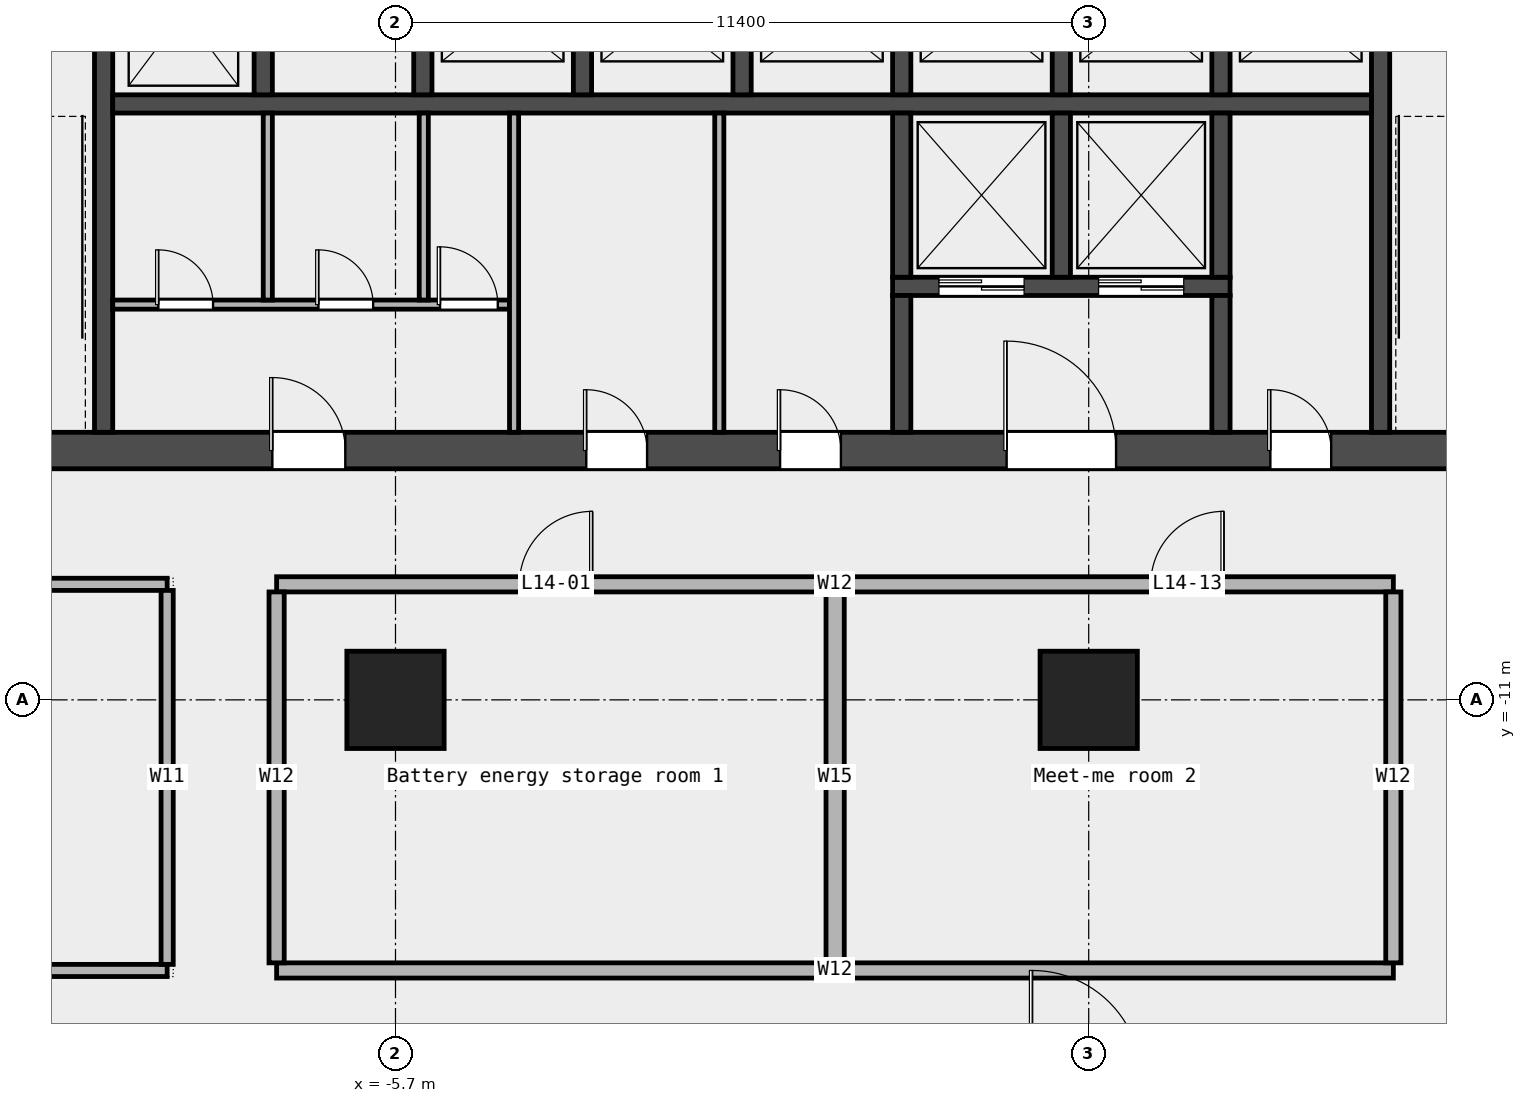
"""IFC4 building model, lengths in metres.
Left out: names, types, materials, properties, quantities, classifications, styles, units other than length and angle.
Written with IfcOpenShell. Run it as: python <this file> out.ifc"""

import sys

from ifc_helpers import new_model, si_unit, direction, frame, frame_2d, origin, origin_2d, place, context, subcontext, project, spatial, rectangle, extrude, element, fill, save


model = new_model("IFC4")
c1 = context("Model", 3, precision=1e-05, world=origin(), true_north=direction((0.0, 1.0)))
c2 = subcontext(c1, "Body", "Model", "MODEL_VIEW")
j1 = project(units=[si_unit("LENGTHUNIT", "METRE"), si_unit("PLANEANGLEUNIT", "RADIAN")], contexts=[c1])
p1 = place(None, origin())
s1 = spatial("IfcSite", under=j1, at=p1, CompositionType="ELEMENT")
p2 = place(p1, origin())
s2 = spatial("IfcBuilding", under=s1, at=p2, CompositionType="ELEMENT")
p3 = place(p2, frame((0.0, 0.0, 74.2)))
s3 = spatial("IfcBuildingStorey", under=s2, at=p3, CompositionType="ELEMENT", Elevation=74.2)
for number, where, z_axis, x_axis in (
    (1, (-5.7, -11.0, 0.0), (0.0, 0.0, 1.0), (1.0, 0.0, 0.0)),
    (2, (5.7, -11.0, 0.0), (0.0, 0.0, 1.0), (1.0, 0.0, 0.0)),
):
    element("IfcColumn", number, at=place(p3, frame(where, z_axis=z_axis, x_axis=x_axis)), inside=s3, PredefinedType="COLUMN", context=c2, shape_type="SweptSolid", body=[
        extrude(rectangle(XDim=1.6, YDim=1.6, at=origin_2d()), origin(), (0.0, 0.0, 1.0), 4.35),
    ])
p4 = place(p3, frame((-24.525, -15.45, 0.0), z_axis=(0.0, 0.0, 1.0), x_axis=(1.0, 0.0, 0.0)))
e3 = element("IfcWall", 3, at=p4, inside=s3, PredefinedType="PARTITIONING", context=c2, shape_type="SweptSolid", body=[
    extrude(rectangle(XDim=15.07, YDim=0.2, at=frame_2d((7.535, 0.0))), origin(), (0.0, 0.0, 1.0), 4.35),
])
p5 = place(p4, frame((6.785, 0.0, 0.0)))
e4 = element("IfcOpeningElement", 4, at=p5, cuts=e3, PredefinedType="OPENING", context=c2, shape_type="SweptSolid", body=[
    extrude(rectangle(XDim=1.5, YDim=2.1, at=frame_2d((0.75, 1.05))), frame((0.0, 0.112, 0.0), z_axis=(0.0, -1.0, 0.0), x_axis=(1.0, 0.0, 0.0)), (0.0, 0.0, 1.0), 0.224),
])
p6 = place(p3, frame((-7.655, -15.45, 0.0), z_axis=(0.0, 0.0, 1.0), x_axis=(1.0, 0.0, 0.0)))
e5 = element("IfcWall", 5, at=p6, inside=s3, PredefinedType="PARTITIONING", context=c2, shape_type="SweptSolid", body=[
    extrude(rectangle(XDim=18.365, YDim=0.25, at=frame_2d((9.183, 0.0))), origin(), (0.0, 0.0, 1.0), 4.35),
])
p7 = place(p3, frame((-16.3, -9.1, 0.0), z_axis=(0.0, 0.0, 1.0), x_axis=(1.0, 0.0, 0.0)))
e6 = element("IfcWall", 6, at=p7, inside=s3, PredefinedType="PARTITIONING", context=c2, shape_type="SweptSolid", body=[
    extrude(rectangle(XDim=6.845, YDim=0.2, at=frame_2d((3.422, 0.0))), origin(), (0.0, 0.0, 1.0), 4.35),
])
p8 = place(p3, frame((-7.655, -9.1, 0.0), z_axis=(0.0, 0.0, 1.0), x_axis=(1.0, 0.0, 0.0)))
e7 = element("IfcWall", 7, at=p8, inside=s3, PredefinedType="PARTITIONING", context=c2, shape_type="SweptSolid", body=[
    extrude(rectangle(XDim=18.365, YDim=0.25, at=frame_2d((9.183, 0.0))), origin(), (0.0, 0.0, 1.0), 4.35),
])
p9 = place(p8, frame((3.992, 0.0, 0.0)))
e8 = element("IfcOpeningElement", 8, at=p9, cuts=e7, PredefinedType="OPENING", context=c2, shape_type="SweptSolid", body=[
    extrude(rectangle(XDim=1.2, YDim=2.1, at=frame_2d((0.6, 1.05))), frame((0.0, 0.137, 0.0), z_axis=(0.0, -1.0, 0.0), x_axis=(1.0, 0.0, 0.0)), (0.0, 0.0, 1.0), 0.274),
])
p10 = place(p8, frame((14.375, 0.0, 0.0)))
e9 = element("IfcOpeningElement", 9, at=p10, cuts=e7, PredefinedType="OPENING", context=c2, shape_type="SweptSolid", body=[
    extrude(rectangle(XDim=1.2, YDim=2.1, at=frame_2d((0.6, 1.05))), frame((0.0, 0.137, 0.0), z_axis=(0.0, -1.0, 0.0), x_axis=(1.0, 0.0, 0.0)), (0.0, 0.0, 1.0), 0.274),
])
p11 = place(p3, frame((-9.455, -15.35, 0.0), z_axis=(0.0, 0.0, 1.0), x_axis=(0.0, 1.0, 0.0)))
e10 = element("IfcWall", 10, at=p11, inside=s3, PredefinedType="PARTITIONING", context=c2, shape_type="SweptSolid", body=[
    extrude(rectangle(XDim=6.15, YDim=0.2, at=frame_2d((3.075, 0.0))), origin(), (0.0, 0.0, 1.0), 4.35),
])
p12 = place(p3, frame((-7.655, -15.325, 0.0), z_axis=(0.0, 0.0, 1.0), x_axis=(0.0, 1.0, 0.0)))
e11 = element("IfcWall", 11, at=p12, inside=s3, PredefinedType="PARTITIONING", context=c2, shape_type="SweptSolid", body=[
    extrude(rectangle(XDim=6.1, YDim=0.25, at=frame_2d((3.05, 0.0))), origin(), (0.0, 0.0, 1.0), 4.35),
])
p13 = place(p3, frame((1.53, -15.325, 0.0), z_axis=(0.0, 0.0, 1.0), x_axis=(0.0, 1.0, 0.0)))
e12 = element("IfcWall", 12, at=p13, inside=s3, PredefinedType="PARTITIONING", context=c2, shape_type="SweptSolid", body=[
    extrude(rectangle(XDim=6.1, YDim=0.3, at=frame_2d((3.05, 0.0))), origin(), (0.0, 0.0, 1.0), 4.35),
])
p14 = place(p3, frame((10.71, -15.325, 0.0), z_axis=(0.0, 0.0, 1.0), x_axis=(0.0, 1.0, 0.0)))
e13 = element("IfcWall", 13, at=p14, inside=s3, PredefinedType="PARTITIONING", context=c2, shape_type="SweptSolid", body=[
    extrude(rectangle(XDim=6.1, YDim=0.25, at=frame_2d((3.05, 0.0))), origin(), (0.0, 0.0, 1.0), 4.35),
])
p15 = place(p3, frame((-14.4, -6.9, 0.0), z_axis=(0.0, 0.0, 1.0), x_axis=(1.0, 0.0, 0.0)))
e14 = element("IfcWall", 14, at=p15, inside=s3, PredefinedType="SHEAR", context=c2, shape_type="SweptSolid", body=[
    extrude(rectangle(XDim=28.8, YDim=0.6, at=frame_2d((14.4, 0.0))), origin(), (0.0, 0.0, 1.0), 4.5),
])
p16 = place(p15, frame((6.675, 0.0, 0.0)))
e15 = element("IfcOpeningElement", 15, at=p16, cuts=e14, PredefinedType="OPENING", context=c2, shape_type="SweptSolid", body=[
    extrude(rectangle(XDim=1.2, YDim=2.1, at=frame_2d((0.6, 1.05))), frame((0.0, 0.312, 0.0), z_axis=(0.0, -1.0, 0.0), x_axis=(1.0, 0.0, 0.0)), (0.0, 0.0, 1.0), 0.624),
])
p17 = place(p15, frame((11.837, 0.0, 0.0)))
e16 = element("IfcOpeningElement", 16, at=p17, cuts=e14, PredefinedType="OPENING", context=c2, shape_type="SweptSolid", body=[
    extrude(rectangle(XDim=1.0, YDim=2.1, at=frame_2d((0.5, 1.05))), frame((0.0, 0.312, 0.0), z_axis=(0.0, -1.0, 0.0), x_axis=(1.0, 0.0, 0.0)), (0.0, 0.0, 1.0), 0.624),
])
p18 = place(p15, frame((15.025, 0.0, 0.0)))
e17 = element("IfcOpeningElement", 17, at=p18, cuts=e14, PredefinedType="OPENING", context=c2, shape_type="SweptSolid", body=[
    extrude(rectangle(XDim=1.0, YDim=2.1, at=frame_2d((0.5, 1.05))), frame((0.0, 0.312, 0.0), z_axis=(0.0, -1.0, 0.0), x_axis=(1.0, 0.0, 0.0)), (0.0, 0.0, 1.0), 0.624),
])
p19 = place(p15, frame((18.75, 0.0, 0.0)))
e18 = element("IfcOpeningElement", 18, at=p19, cuts=e14, PredefinedType="OPENING", context=c2, shape_type="SweptSolid", body=[
    extrude(rectangle(XDim=1.8, YDim=2.1, at=frame_2d((0.9, 1.05))), frame((0.0, 0.312, 0.0), z_axis=(0.0, -1.0, 0.0), x_axis=(1.0, 0.0, 0.0)), (0.0, 0.0, 1.0), 0.624),
])
p20 = place(p15, frame((23.087, 0.0, 0.0)))
e19 = element("IfcOpeningElement", 19, at=p20, cuts=e14, PredefinedType="OPENING", context=c2, shape_type="SweptSolid", body=[
    extrude(rectangle(XDim=1.0, YDim=2.1, at=frame_2d((0.5, 1.05))), frame((0.0, 0.312, 0.0), z_axis=(0.0, -1.0, 0.0), x_axis=(1.0, 0.0, 0.0)), (0.0, 0.0, 1.0), 0.624),
])
for number, where, z_axis, x_axis in (
    (20, (-10.5, -6.6, 0.0), (0.0, 0.0, 1.0), (0.0, 1.0, 0.0)),
    (21, (10.5, -6.6, 0.0), (0.0, 0.0, 1.0), (0.0, 1.0, 0.0)),
):
    element("IfcWall", number, at=place(p3, frame(where, z_axis=z_axis, x_axis=x_axis)), inside=s3, PredefinedType="SHEAR", context=c2, shape_type="SweptSolid", body=[
        extrude(rectangle(XDim=8.55, YDim=0.3, at=frame_2d((4.275, 0.0))), origin(), (0.0, 0.0, 1.0), 4.5),
    ])
p21 = place(p3, frame((-10.35, -1.2, 0.0), z_axis=(0.0, 0.0, 1.0), x_axis=(1.0, 0.0, 0.0)))
e22 = element("IfcWall", 22, at=p21, inside=s3, PredefinedType="SOLIDWALL", context=c2, shape_type="SweptSolid", body=[
    extrude(rectangle(XDim=20.7, YDim=0.3, at=frame_2d((10.35, 0.0))), origin(), (0.0, 0.0, 1.0), 4.5),
])
for number, where, z_axis, x_axis in (
    (23, (-7.875, -1.05, 0.0), (0.0, 0.0, 1.0), (0.0, 1.0, 0.0)),
    (24, (-5.25, -1.05, 0.0), (0.0, 0.0, 1.0), (0.0, 1.0, 0.0)),
    (25, (-2.625, -1.05, 0.0), (0.0, 0.0, 1.0), (0.0, 1.0, 0.0)),
    (26, (0.0, -1.05, 0.0), (0.0, 0.0, 1.0), (0.0, 1.0, 0.0)),
    (27, (2.625, -1.05, 0.0), (0.0, 0.0, 1.0), (0.0, 1.0, 0.0)),
    (28, (5.25, -1.05, 0.0), (0.0, 0.0, 1.0), (0.0, 1.0, 0.0)),
    (29, (7.875, -1.05, 0.0), (0.0, 0.0, 1.0), (0.0, 1.0, 0.0)),
):
    element("IfcWall", number, at=place(p3, frame(where, z_axis=z_axis, x_axis=x_axis)), inside=s3, PredefinedType="SOLIDWALL", context=c2, shape_type="SweptSolid", body=[
        extrude(rectangle(XDim=2.7, YDim=0.3, at=frame_2d((1.35, 0.0))), origin(), (0.0, 0.0, 1.0), 4.5),
    ])
p22 = place(p3, frame((2.475, -4.2, 0.0), z_axis=(0.0, 0.0, 1.0), x_axis=(1.0, 0.0, 0.0)))
e30 = element("IfcWall", 30, at=p22, inside=s3, PredefinedType="SOLIDWALL", context=c2, shape_type="SweptSolid", body=[
    extrude(rectangle(XDim=5.55, YDim=0.3, at=frame_2d((2.775, 0.0))), origin(), (0.0, 0.0, 1.0), 4.5),
])
p23 = place(p22, frame((0.762, 0.0, 0.0)))
e31 = element("IfcOpeningElement", 31, at=p23, cuts=e30, PredefinedType="OPENING", context=c2, shape_type="SweptSolid", body=[
    extrude(rectangle(XDim=1.4, YDim=2.1, at=frame_2d((0.7, 1.05))), frame((0.0, 0.162, 0.0), z_axis=(0.0, -1.0, 0.0), x_axis=(1.0, 0.0, 0.0)), (0.0, 0.0, 1.0), 0.324),
])
p24 = place(p22, frame((3.387, 0.0, 0.0)))
e32 = element("IfcOpeningElement", 32, at=p24, cuts=e30, PredefinedType="OPENING", context=c2, shape_type="SweptSolid", body=[
    extrude(rectangle(XDim=1.4, YDim=2.1, at=frame_2d((0.7, 1.05))), frame((0.0, 0.162, 0.0), z_axis=(0.0, -1.0, 0.0), x_axis=(1.0, 0.0, 0.0)), (0.0, 0.0, 1.0), 0.324),
])
p25 = place(p3, frame((2.625, -4.05, 0.0), z_axis=(0.0, 0.0, 1.0), x_axis=(0.0, 1.0, 0.0)))
e33 = element("IfcWall", 33, at=p25, inside=s3, PredefinedType="SOLIDWALL", context=c2, shape_type="SweptSolid", body=[
    extrude(rectangle(XDim=2.7, YDim=0.3, at=frame_2d((1.35, 0.0))), origin(), (0.0, 0.0, 1.0), 4.5),
])
p26 = place(p3, frame((2.625, -6.6, 0.0), z_axis=(0.0, 0.0, 1.0), x_axis=(0.0, 1.0, 0.0)))
e34 = element("IfcWall", 34, at=p26, inside=s3, PredefinedType="SOLIDWALL", context=c2, shape_type="SweptSolid", body=[
    extrude(rectangle(XDim=2.25, YDim=0.3, at=frame_2d((1.125, 0.0))), origin(), (0.0, 0.0, 1.0), 4.5),
])
for number, where, z_axis, x_axis in (
    (35, (5.25, -4.05, 0.0), (0.0, 0.0, 1.0), (0.0, 1.0, 0.0)),
    (36, (7.875, -4.05, 0.0), (0.0, 0.0, 1.0), (0.0, 1.0, 0.0)),
):
    element("IfcWall", number, at=place(p3, frame(where, z_axis=z_axis, x_axis=x_axis)), inside=s3, PredefinedType="SOLIDWALL", context=c2, shape_type="SweptSolid", body=[
        extrude(rectangle(XDim=2.7, YDim=0.3, at=frame_2d((1.35, 0.0))), origin(), (0.0, 0.0, 1.0), 4.5),
    ])
p27 = place(p3, frame((7.875, -6.6, 0.0), z_axis=(0.0, 0.0, 1.0), x_axis=(0.0, 1.0, 0.0)))
e37 = element("IfcWall", 37, at=p27, inside=s3, PredefinedType="SOLIDWALL", context=c2, shape_type="SweptSolid", body=[
    extrude(rectangle(XDim=2.25, YDim=0.3, at=frame_2d((1.125, 0.0))), origin(), (0.0, 0.0, 1.0), 4.5),
])
p28 = place(p3, frame((-10.35, -4.5, 0.0), z_axis=(0.0, 0.0, 1.0), x_axis=(1.0, 0.0, 0.0)))
e38 = element("IfcWall", 38, at=p28, inside=s3, PredefinedType="PARTITIONING", context=c2, shape_type="SweptSolid", body=[
    extrude(rectangle(XDim=6.525, YDim=0.15, at=frame_2d((3.263, 0.0))), origin(), (0.0, 0.0, 1.0), 4.5),
])
p29 = place(p28, frame((0.75, 0.0, 0.0)))
e39 = element("IfcOpeningElement", 39, at=p29, cuts=e38, PredefinedType="OPENING", context=c2, shape_type="SweptSolid", body=[
    extrude(rectangle(XDim=0.9, YDim=2.1, at=frame_2d((0.45, 1.05))), frame((0.0, 0.087, 0.0), z_axis=(0.0, -1.0, 0.0), x_axis=(1.0, 0.0, 0.0)), (0.0, 0.0, 1.0), 0.174),
])
p30 = place(p28, frame((3.383, 0.0, 0.0)))
e40 = element("IfcOpeningElement", 40, at=p30, cuts=e38, PredefinedType="OPENING", context=c2, shape_type="SweptSolid", body=[
    extrude(rectangle(XDim=0.9, YDim=2.1, at=frame_2d((0.45, 1.05))), frame((0.0, 0.087, 0.0), z_axis=(0.0, -1.0, 0.0), x_axis=(1.0, 0.0, 0.0)), (0.0, 0.0, 1.0), 0.174),
])
p31 = place(p28, frame((5.383, 0.0, 0.0)))
e41 = element("IfcOpeningElement", 41, at=p31, cuts=e38, PredefinedType="OPENING", context=c2, shape_type="SweptSolid", body=[
    extrude(rectangle(XDim=0.95, YDim=2.1, at=frame_2d((0.475, 1.05))), frame((0.0, 0.087, 0.0), z_axis=(0.0, -1.0, 0.0), x_axis=(1.0, 0.0, 0.0)), (0.0, 0.0, 1.0), 0.174),
])
for number, where, z_axis, x_axis in (
    (42, (-7.8, -4.425, 0.0), (0.0, 0.0, 1.0), (0.0, 1.0, 0.0)),
    (43, (-5.235, -4.425, 0.0), (0.0, 0.0, 1.0), (0.0, 1.0, 0.0)),
):
    element("IfcWall", number, at=place(p3, frame(where, z_axis=z_axis, x_axis=x_axis)), inside=s3, PredefinedType="PARTITIONING", context=c2, shape_type="SweptSolid", body=[
        extrude(rectangle(XDim=3.075, YDim=0.15, at=frame_2d((1.538, 0.0))), origin(), (0.0, 0.0, 1.0), 4.5),
    ])
for number, where, z_axis, x_axis in (
    (44, (-3.75, -6.6, 0.0), (0.0, 0.0, 1.0), (0.0, 1.0, 0.0)),
    (45, (-0.375, -6.6, 0.0), (0.0, 0.0, 1.0), (0.0, 1.0, 0.0)),
):
    element("IfcWall", number, at=place(p3, frame(where, z_axis=z_axis, x_axis=x_axis)), inside=s3, PredefinedType="PARTITIONING", context=c2, shape_type="SweptSolid", body=[
        extrude(rectangle(XDim=5.25, YDim=0.15, at=frame_2d((2.625, 0.0))), origin(), (0.0, 0.0, 1.0), 4.5),
    ])
p32 = place(p9, origin())
e46 = element("IfcDoor", 46, at=p32, inside=s3, OperationType="SINGLE_SWING_RIGHT", PredefinedType="DOOR", context=c2, shape_type="SweptSolid", body=[
    extrude(rectangle(XDim=1.2, YDim=2.1, at=frame_2d((0.6, 1.05))), frame((0.0, 0.025, 0.0), z_axis=(0.0, -1.0, 0.0), x_axis=(1.0, 0.0, 0.0)), (0.0, 0.0, 1.0), 0.05),
])
fill(e8, e46)
p33 = place(p10, origin())
e47 = element("IfcDoor", 47, at=p33, inside=s3, OperationType="SINGLE_SWING_RIGHT", PredefinedType="DOOR", context=c2, shape_type="SweptSolid", body=[
    extrude(rectangle(XDim=1.2, YDim=2.1, at=frame_2d((0.6, 1.05))), frame((0.0, 0.025, 0.0), z_axis=(0.0, -1.0, 0.0), x_axis=(1.0, 0.0, 0.0)), (0.0, 0.0, 1.0), 0.05),
])
fill(e9, e47)
p34 = place(p23, origin())
e48 = element("IfcDoor", 48, at=p34, inside=s3, OperationType="DOUBLE_DOOR_SLIDING", PredefinedType="DOOR", context=c2, shape_type="SweptSolid", body=[
    extrude(rectangle(XDim=1.4, YDim=2.1, at=frame_2d((0.7, 1.05))), frame((0.0, 0.025, 0.0), z_axis=(0.0, -1.0, 0.0), x_axis=(1.0, 0.0, 0.0)), (0.0, 0.0, 1.0), 0.05),
])
fill(e31, e48)
p35 = place(p24, origin())
e49 = element("IfcDoor", 49, at=p35, inside=s3, OperationType="DOUBLE_DOOR_SLIDING", PredefinedType="DOOR", context=c2, shape_type="SweptSolid", body=[
    extrude(rectangle(XDim=1.4, YDim=2.1, at=frame_2d((0.7, 1.05))), frame((0.0, 0.025, 0.0), z_axis=(0.0, -1.0, 0.0), x_axis=(1.0, 0.0, 0.0)), (0.0, 0.0, 1.0), 0.05),
])
fill(e32, e49)
p36 = place(p16, origin())
e50 = element("IfcDoor", 50, at=p36, inside=s3, OperationType="SINGLE_SWING_LEFT", PredefinedType="DOOR", context=c2, shape_type="SweptSolid", body=[
    extrude(rectangle(XDim=1.2, YDim=2.1, at=frame_2d((0.6, 1.05))), frame((0.0, 0.025, 0.0), z_axis=(0.0, -1.0, 0.0), x_axis=(1.0, 0.0, 0.0)), (0.0, 0.0, 1.0), 0.05),
])
fill(e15, e50)
p37 = place(p29, origin())
e51 = element("IfcDoor", 51, at=p37, inside=s3, OperationType="SINGLE_SWING_LEFT", PredefinedType="DOOR", context=c2, shape_type="SweptSolid", body=[
    extrude(rectangle(XDim=0.9, YDim=2.1, at=frame_2d((0.45, 1.05))), frame((0.0, 0.025, 0.0), z_axis=(0.0, -1.0, 0.0), x_axis=(1.0, 0.0, 0.0)), (0.0, 0.0, 1.0), 0.05),
])
fill(e39, e51)
p38 = place(p30, origin())
e52 = element("IfcDoor", 52, at=p38, inside=s3, OperationType="SINGLE_SWING_LEFT", PredefinedType="DOOR", context=c2, shape_type="SweptSolid", body=[
    extrude(rectangle(XDim=0.9, YDim=2.1, at=frame_2d((0.45, 1.05))), frame((0.0, 0.025, 0.0), z_axis=(0.0, -1.0, 0.0), x_axis=(1.0, 0.0, 0.0)), (0.0, 0.0, 1.0), 0.05),
])
fill(e40, e52)
p39 = place(p31, origin())
e53 = element("IfcDoor", 53, at=p39, inside=s3, OperationType="SINGLE_SWING_LEFT", PredefinedType="DOOR", context=c2, shape_type="SweptSolid", body=[
    extrude(rectangle(XDim=0.95, YDim=2.1, at=frame_2d((0.475, 1.05))), frame((0.0, 0.025, 0.0), z_axis=(0.0, -1.0, 0.0), x_axis=(1.0, 0.0, 0.0)), (0.0, 0.0, 1.0), 0.05),
])
fill(e41, e53)
p40 = place(p17, origin())
e54 = element("IfcDoor", 54, at=p40, inside=s3, OperationType="SINGLE_SWING_LEFT", PredefinedType="DOOR", context=c2, shape_type="SweptSolid", body=[
    extrude(rectangle(XDim=1.0, YDim=2.1, at=frame_2d((0.5, 1.05))), frame((0.0, 0.025, 0.0), z_axis=(0.0, -1.0, 0.0), x_axis=(1.0, 0.0, 0.0)), (0.0, 0.0, 1.0), 0.05),
])
fill(e16, e54)
p41 = place(p18, origin())
e55 = element("IfcDoor", 55, at=p41, inside=s3, OperationType="SINGLE_SWING_LEFT", PredefinedType="DOOR", context=c2, shape_type="SweptSolid", body=[
    extrude(rectangle(XDim=1.0, YDim=2.1, at=frame_2d((0.5, 1.05))), frame((0.0, 0.025, 0.0), z_axis=(0.0, -1.0, 0.0), x_axis=(1.0, 0.0, 0.0)), (0.0, 0.0, 1.0), 0.05),
])
fill(e17, e55)
p42 = place(p19, origin())
e56 = element("IfcDoor", 56, at=p42, inside=s3, OperationType="DOUBLE_DOOR_SINGLE_SWING", PredefinedType="DOOR", context=c2, shape_type="SweptSolid", body=[
    extrude(rectangle(XDim=1.8, YDim=2.1, at=frame_2d((0.9, 1.05))), frame((0.0, 0.025, 0.0), z_axis=(0.0, -1.0, 0.0), x_axis=(1.0, 0.0, 0.0)), (0.0, 0.0, 1.0), 0.05),
])
fill(e18, e56)
p43 = place(p20, origin())
e57 = element("IfcDoor", 57, at=p43, inside=s3, OperationType="SINGLE_SWING_LEFT", PredefinedType="DOOR", context=c2, shape_type="SweptSolid", body=[
    extrude(rectangle(XDim=1.0, YDim=2.1, at=frame_2d((0.5, 1.05))), frame((0.0, 0.025, 0.0), z_axis=(0.0, -1.0, 0.0), x_axis=(1.0, 0.0, 0.0)), (0.0, 0.0, 1.0), 0.05),
])
fill(e19, e57)
save(model, sys.argv[1])
